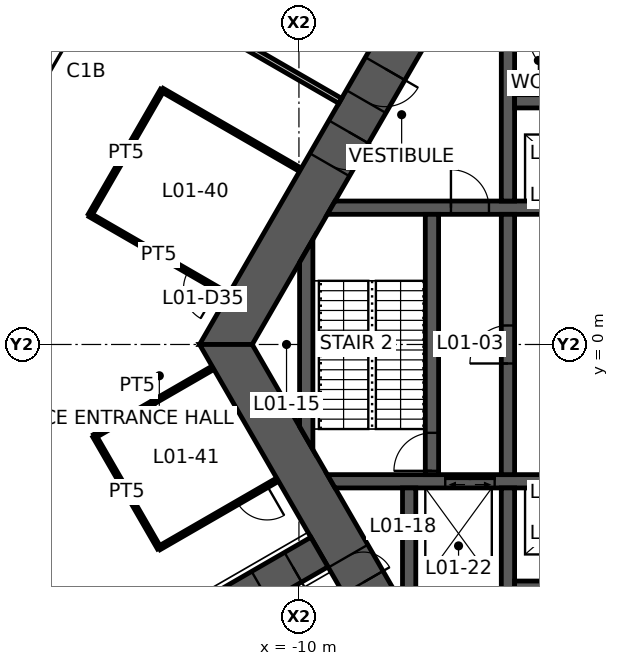
"""IFC4 building model, lengths in metres.
Left out: names, types, materials, properties, quantities, classifications, styles, units other than length and angle.
Written with IfcOpenShell. Run it as: python <this file> out.ifc"""

import sys

from ifc_helpers import new_model, si_unit, direction, frame, frame_2d, origin, place, context, subcontext, project, spatial, polyline, rectangle, outline, extrude, element, fill, save


model = new_model("IFC4")
c1 = context("Model", 3, precision=1e-05, world=origin(), true_north=direction((0.0, 1.0)))
c2 = subcontext(c1, "Body", "Model", "MODEL_VIEW")
j1 = project(units=[si_unit("LENGTHUNIT", "METRE"), si_unit("PLANEANGLEUNIT", "RADIAN")], contexts=[c1])
p1 = place(None, origin())
s1 = spatial("IfcSite", under=j1, at=p1, CompositionType="ELEMENT")
p2 = place(p1, origin())
s2 = spatial("IfcBuilding", under=s1, at=p2, CompositionType="ELEMENT")
p3 = place(p2, origin())
s3 = spatial("IfcBuildingStorey", under=s2, at=p3, CompositionType="ELEMENT", Elevation=0.0)
p4 = place(p3, frame((-5.961, 10.325, 0.0), z_axis=(0.0, 0.0, 1.0), x_axis=(-0.500004296715, -0.866022923061, 0.0)))
e1 = element("IfcWall", 1, at=p4, inside=s3, PredefinedType="SHEAR", context=c2, shape_type="SweptSolid", body=[
    extrude(outline(polyline([(-0.346, -0.6), (3.541, -0.6), (4.541, -0.6), (5.461, -0.6), (6.461, -0.6), (12.269, -0.6), (11.576, 0.6), (6.461, 0.6), (5.461, 0.6), (4.541, 0.6), (3.541, 0.6), (0.346, 0.6), (-0.346, -0.6)])), origin(), (0.0, 0.0, 1.0), 5.5),
])
p5 = place(p4, frame((3.541, 0.0, 0.0)))
e2 = element("IfcOpeningElement", 2, at=p5, cuts=e1, PredefinedType="OPENING", context=c2, shape_type="SweptSolid", body=[
    extrude(rectangle(XDim=1.0, YDim=2.1, at=frame_2d((0.5, 1.05))), frame((0.0, 0.61, 0.0), z_axis=(0.0, -1.0, 0.0), x_axis=(1.0, 0.0, 0.0)), (0.0, 0.0, 1.0), 1.22),
])
p6 = place(p4, frame((5.461, 0.0, 0.0)))
e3 = element("IfcOpeningElement", 3, at=p6, cuts=e1, PredefinedType="OPENING", context=c2, shape_type="SweptSolid", body=[
    extrude(rectangle(XDim=1.0, YDim=2.1, at=frame_2d((0.5, 1.05))), frame((0.0, 0.61, 0.0), z_axis=(0.0, -1.0, 0.0), x_axis=(1.0, 0.0, 0.0)), (0.0, 0.0, 1.0), 1.22),
])
p7 = place(p3, frame((-11.922, 0.0, 0.0), z_axis=(0.0, 0.0, 1.0), x_axis=(0.500004296715, -0.866022923061, 0.0)))
e4 = element("IfcWall", 4, at=p7, inside=s3, PredefinedType="SHEAR", context=c2, shape_type="SweptSolid", body=[
    extrude(outline(polyline([(-0.346, -0.6), (6.431, -0.6), (7.231, -0.6), (12.269, -0.6), (11.576, 0.6), (7.231, 0.6), (6.431, 0.6), (0.346, 0.6), (-0.346, -0.6)])), origin(), (0.0, 0.0, 1.0), 5.5),
])
p8 = place(p7, frame((6.431, 0.0, 0.0)))
e5 = element("IfcOpeningElement", 5, at=p8, cuts=e4, PredefinedType="OPENING", context=c2, shape_type="SweptSolid", body=[
    extrude(rectangle(XDim=0.8, YDim=2.1, at=frame_2d((0.4, 1.05))), frame((0.0, 0.61, 0.0), z_axis=(0.0, -1.0, 0.0), x_axis=(1.0, 0.0, 0.0)), (0.0, 0.0, 1.0), 1.22),
])
p9 = place(p3, frame((-9.461, -5.462, 0.0), z_axis=(0.0, 0.0, 1.0), x_axis=(-0.866019116917, -0.500010889016, 0.0)))
e6 = element("IfcWall", 6, at=p9, inside=s3, PredefinedType="SHEAR", context=c2, shape_type="SweptSolid", body=[
    extrude(rectangle(XDim=7.595, YDim=0.9, at=frame_2d((3.798, 0.0))), origin(), (0.0, 0.0, 1.0), 5.5),
])
p10 = place(p9, frame((0.8, 0.0, 0.0)))
e7 = element("IfcOpeningElement", 7, at=p10, cuts=e6, PredefinedType="OPENING", context=c2, shape_type="SweptSolid", body=[
    extrude(rectangle(XDim=1.0, YDim=2.1, at=frame_2d((0.5, 1.05))), frame((0.0, 0.46, 0.0), z_axis=(0.0, -1.0, 0.0), x_axis=(1.0, 0.0, 0.0)), (0.0, 0.0, 1.0), 0.92),
])
p11 = place(p3, frame((-9.151, 3.6, 0.0), z_axis=(0.0, 0.0, 1.0), x_axis=(1.0, 0.0, 0.0)))
e8 = element("IfcWall", 8, at=p11, inside=s3, PredefinedType="SHEAR", context=c2, shape_type="SweptSolid", body=[
    extrude(outline(polyline([(-0.101, -0.175), (3.151, -0.175), (4.151, -0.175), (5.551, -0.175), (6.651, -0.175), (7.726, -0.175), (7.726, 0.175), (6.651, 0.175), (5.551, 0.175), (4.151, 0.175), (3.151, 0.175), (0.101, 0.175), (-0.101, -0.175)])), origin(), (0.0, 0.0, 1.0), 5.5),
])
p12 = place(p11, frame((3.151, 0.0, 0.0)))
e9 = element("IfcOpeningElement", 9, at=p12, cuts=e8, PredefinedType="OPENING", context=c2, shape_type="SweptSolid", body=[
    extrude(rectangle(XDim=1.0, YDim=2.1, at=frame_2d((0.5, 1.05))), frame((0.0, 0.185, 0.0), z_axis=(0.0, -1.0, 0.0), x_axis=(1.0, 0.0, 0.0)), (0.0, 0.0, 1.0), 0.37),
])
p13 = place(p11, frame((5.551, 0.0, 0.0)))
e10 = element("IfcOpeningElement", 10, at=p13, cuts=e8, PredefinedType="OPENING", context=c2, shape_type="SweptSolid", body=[
    extrude(rectangle(XDim=1.1, YDim=2.1, at=frame_2d((0.55, 1.05))), frame((0.0, 0.185, 0.0), z_axis=(0.0, -1.0, 0.0), x_axis=(1.0, 0.0, 0.0)), (0.0, 0.0, 1.0), 0.37),
])
p14 = place(p3, frame((-9.151, -3.6, 0.0), z_axis=(0.0, 0.0, 1.0), x_axis=(1.0, 0.0, 0.0)))
e11 = element("IfcWall", 11, at=p14, inside=s3, PredefinedType="SHEAR", context=c2, shape_type="SweptSolid", body=[
    extrude(outline(polyline([(0.101, -0.175), (3.001, -0.175), (4.301, -0.175), (5.551, -0.175), (6.651, -0.175), (7.726, -0.175), (7.726, 0.175), (6.651, 0.175), (5.551, 0.175), (4.301, 0.175), (3.001, 0.175), (-0.101, 0.175), (0.101, -0.175)])), origin(), (0.0, 0.0, 1.0), 5.5),
])
p15 = place(p14, frame((5.551, 0.0, 0.0)))
e12 = element("IfcOpeningElement", 12, at=p15, cuts=e11, PredefinedType="OPENING", context=c2, shape_type="SweptSolid", body=[
    extrude(rectangle(XDim=1.1, YDim=2.1, at=frame_2d((0.55, 1.05))), frame((0.0, 0.185, 0.0), z_axis=(0.0, -1.0, 0.0), x_axis=(1.0, 0.0, 0.0)), (0.0, 0.0, 1.0), 0.37),
])
p16 = place(p14, frame((3.001, 0.0, 0.0)))
e13 = element("IfcOpeningElement", 13, at=p16, cuts=e11, PredefinedType="OPENING", context=c2, shape_type="SweptSolid", body=[
    extrude(rectangle(XDim=1.3, YDim=2.1, at=frame_2d((0.65, 1.05))), frame((0.0, 0.185, 0.0), z_axis=(0.0, -1.0, 0.0), x_axis=(1.0, 0.0, 0.0)), (0.0, 0.0, 1.0), 0.37),
])
p17 = place(p3, frame((-4.5, -3.425, 0.0), z_axis=(0.0, 0.0, 1.0), x_axis=(0.0, 1.0, 0.0)))
e14 = element("IfcWall", 14, at=p17, inside=s3, PredefinedType="SHEAR", context=c2, shape_type="SweptSolid", body=[
    extrude(rectangle(XDim=6.85, YDim=0.35, at=frame_2d((3.425, 0.0))), origin(), (0.0, 0.0, 1.0), 5.5),
])
p18 = place(p17, frame((2.925, 0.0, 0.0)))
e15 = element("IfcOpeningElement", 15, at=p18, cuts=e14, PredefinedType="OPENING", context=c2, shape_type="SweptSolid", body=[
    extrude(rectangle(XDim=1.0, YDim=2.1, at=frame_2d((0.5, 1.05))), frame((0.0, 0.185, 0.0), z_axis=(0.0, -1.0, 0.0), x_axis=(1.0, 0.0, 0.0)), (0.0, 0.0, 1.0), 0.37),
])
p19 = place(p3, frame((-6.5, -3.425, 0.0), z_axis=(0.0, 0.0, 1.0), x_axis=(0.0, 1.0, 0.0)))
e16 = element("IfcWall", 16, at=p19, inside=s3, PredefinedType="SHEAR", context=c2, shape_type="SweptSolid", body=[
    extrude(rectangle(XDim=6.85, YDim=0.35, at=frame_2d((3.425, 0.0))), origin(), (0.0, 0.0, 1.0), 5.5),
])
p20 = place(p19, frame((0.1, 0.0, 0.0)))
e17 = element("IfcOpeningElement", 17, at=p20, cuts=e16, PredefinedType="OPENING", context=c2, shape_type="SweptSolid", body=[
    extrude(rectangle(XDim=1.0, YDim=2.1, at=frame_2d((0.5, 1.05))), frame((0.0, 0.185, 0.0), z_axis=(0.0, -1.0, 0.0), x_axis=(1.0, 0.0, 0.0)), (0.0, 0.0, 1.0), 0.37),
])
for number, where, z_axis, x_axis in (
    (18, (-4.5, 3.775, 0.0), (0.0, 0.0, 1.0), (0.0, 1.0, 0.0)),
    (19, (-4.5, -3.775, 0.0), (0.0, 0.0, 1.0), (0.0, -1.0, 0.0)),
):
    element("IfcWall", number, at=place(p3, frame(where, z_axis=z_axis, x_axis=x_axis)), inside=s3, PredefinedType="SHEAR", context=c2, shape_type="SweptSolid", body=[
        extrude(rectangle(XDim=5.95, YDim=0.35, at=frame_2d((2.975, 0.0))), origin(), (0.0, 0.0, 1.0), 5.5),
    ])
for number, where, z_axis, x_axis in (
    (20, (-4.325, 6.4, 0.0), (0.0, 0.0, 1.0), (1.0, 0.0, 0.0)),
    (21, (-4.325, -6.4, 0.0), (0.0, 0.0, 1.0), (1.0, 0.0, 0.0)),
):
    element("IfcWall", number, at=place(p3, frame(where, z_axis=z_axis, x_axis=x_axis)), inside=s3, PredefinedType="SHEAR", context=c2, shape_type="SweptSolid", body=[
        extrude(rectangle(XDim=2.55, YDim=0.35, at=frame_2d((1.275, 0.0))), origin(), (0.0, 0.0, 1.0), 5.5),
    ])
p21 = place(p3, frame((-7.1, -3.775, 0.0), z_axis=(0.0, 0.0, 1.0), x_axis=(0.0, -1.0, 0.0)))
e22 = element("IfcWall", 22, at=p21, inside=s3, PredefinedType="SHEAR", context=c2, shape_type="SweptSolid", body=[
    extrude(outline(polyline([(0.0, -0.175), (3.074, -0.175), (3.377, 0.0), (3.4, 0.175), (0.0, 0.175), (0.0, -0.175)])), origin(), (0.0, 0.0, 1.0), 5.5),
])
p22 = place(p3, frame((-9.808, -2.462, 0.0), z_axis=(0.0, 0.0, 1.0), x_axis=(0.0, 1.0, 0.0)))
e23 = element("IfcWall", 23, at=p22, inside=s3, PredefinedType="SHEAR", context=c2, shape_type="SweptSolid", body=[
    extrude(outline(polyline([(-0.303, -0.175), (5.228, -0.175), (4.621, 0.175), (0.303, 0.175), (-0.303, -0.175)])), origin(), (0.0, 0.0, 1.0), 5.5),
])
p23 = place(p3, frame((-4.325, 6.7, 0.0), z_axis=(0.0, 0.0, 1.0), x_axis=(1.0, 0.0, 0.0)))
e24 = element("IfcWall", 24, at=p23, inside=s3, PredefinedType="PLUMBINGWALL", context=c2, shape_type="SweptSolid", body=[
    extrude(rectangle(XDim=2.55, YDim=0.25, at=frame_2d((1.275, 0.0))), origin(), (0.0, 0.0, 1.0), 5.5),
])
p24 = place(p3, frame((-8.914, 6.411, 0.0), z_axis=(0.0, 0.0, 1.0), x_axis=(-0.866025337903, 0.500000114109, 0.0)))
e25 = element("IfcWall", 25, at=p24, inside=s3, PredefinedType="PARTITIONING", context=c2, shape_type="SweptSolid", body=[
    extrude(rectangle(XDim=6.875, YDim=0.15, at=frame_2d((3.438, 0.0))), origin(), (0.0, 0.0, 1.0), 4.5),
])
p25 = place(p3, frame((-15.499, 3.406, 0.0), z_axis=(0.0, 0.0, 1.0), x_axis=(0.499967155389, 0.866044365799, 0.0)))
e26 = element("IfcWall", 26, at=p25, inside=s3, PredefinedType="PARTITIONING", context=c2, shape_type="SweptSolid", body=[
    extrude(rectangle(XDim=3.8, YDim=0.1, at=frame_2d((1.9, 0.0))), origin(), (0.0, 0.0, 1.0), 4.5),
])
p26 = place(p3, frame((-13.599, 6.697, 0.0), z_axis=(0.0, 0.0, 1.0), x_axis=(0.866024134012, -0.500002199304, 0.0)))
e27 = element("IfcWall", 27, at=p26, inside=s3, PredefinedType="PARTITIONING", context=c2, shape_type="SweptSolid", body=[
    extrude(rectangle(XDim=4.18, YDim=0.1, at=frame_2d((2.09, 0.0))), origin(), (0.0, 0.0, 1.0), 4.5),
])
p27 = place(p3, frame((-11.879, 1.316, 0.0), z_axis=(0.0, 0.0, 1.0), x_axis=(-0.866034823405, 0.499983684383, 0.0)))
e28 = element("IfcWall", 28, at=p27, inside=s3, PredefinedType="PARTITIONING", context=c2, shape_type="SweptSolid", body=[
    extrude(rectangle(XDim=4.18, YDim=0.1, at=frame_2d((2.09, 0.0))), origin(), (0.0, 0.0, 1.0), 4.5),
])
p28 = place(p27, frame((0.3, 0.0, 0.0)))
e29 = element("IfcOpeningElement", 29, at=p28, cuts=e28, PredefinedType="OPENING", context=c2, shape_type="SweptSolid", body=[
    extrude(rectangle(XDim=0.9, YDim=2.1, at=frame_2d((0.45, 1.05))), frame((0.0, 0.06, 0.0), z_axis=(0.0, -1.0, 0.0), x_axis=(1.0, 0.0, 0.0)), (0.0, 0.0, 1.0), 0.12),
])
p29 = place(p3, frame((-15.379, -2.413, 0.0), z_axis=(0.0, 0.0, 1.0), x_axis=(0.866018643436, 0.500011709085, 0.0)))
e30 = element("IfcWall", 30, at=p29, inside=s3, PredefinedType="PARTITIONING", context=c2, shape_type="SweptSolid", body=[
    extrude(rectangle(XDim=3.58, YDim=0.1, at=frame_2d((1.79, 0.0))), origin(), (0.0, 0.0, 1.0), 4.5),
])
p30 = place(p3, frame((-13.679, -5.357, 0.0), z_axis=(0.0, 0.0, 1.0), x_axis=(-0.500008388397, 0.866020560687, 0.0)))
e31 = element("IfcWall", 31, at=p30, inside=s3, PredefinedType="PARTITIONING", context=c2, shape_type="SweptSolid", body=[
    extrude(rectangle(XDim=3.4, YDim=0.1, at=frame_2d((1.7, 0.0))), origin(), (0.0, 0.0, 1.0), 4.5),
])
p31 = place(p3, frame((-10.579, -3.567, 0.0), z_axis=(0.0, 0.0, 1.0), x_axis=(-0.866018643436, -0.500011709085, 0.0)))
e32 = element("IfcWall", 32, at=p31, inside=s3, PredefinedType="PARTITIONING", context=c2, shape_type="SweptSolid", body=[
    extrude(rectangle(XDim=3.58, YDim=0.1, at=frame_2d((1.79, 0.0))), origin(), (0.0, 0.0, 1.0), 4.5),
])
p32 = place(p31, frame((0.3, 0.0, 0.0)))
e33 = element("IfcOpeningElement", 33, at=p32, cuts=e32, PredefinedType="OPENING", context=c2, shape_type="SweptSolid", body=[
    extrude(rectangle(XDim=0.9, YDim=2.1, at=frame_2d((0.45, 1.05))), frame((0.0, 0.06, 0.0), z_axis=(0.0, -1.0, 0.0), x_axis=(1.0, 0.0, 0.0)), (0.0, 0.0, 1.0), 0.12),
])
p33 = place(p8, origin())
e34 = element("IfcDoor", 34, at=p33, inside=s3, OperationType="SINGLE_SWING_RIGHT", PredefinedType="DOOR", context=c2, shape_type="SweptSolid", body=[
    extrude(rectangle(XDim=0.8, YDim=2.1, at=frame_2d((0.4, 1.05))), frame((0.0, 0.025, 0.0), z_axis=(0.0, -1.0, 0.0), x_axis=(1.0, 0.0, 0.0)), (0.0, 0.0, 1.0), 0.05),
])
fill(e5, e34)
p34 = place(p5, origin())
e35 = element("IfcDoor", 35, at=p34, inside=s3, OperationType="SINGLE_SWING_LEFT", PredefinedType="DOOR", context=c2, shape_type="SweptSolid", body=[
    extrude(rectangle(XDim=1.0, YDim=2.1, at=frame_2d((0.5, 1.05))), frame((0.0, 0.025, 0.0), z_axis=(0.0, -1.0, 0.0), x_axis=(1.0, 0.0, 0.0)), (0.0, 0.0, 1.0), 0.05),
])
fill(e2, e35)
p35 = place(p18, origin())
e36 = element("IfcDoor", 36, at=p35, inside=s3, OperationType="SINGLE_SWING_LEFT", PredefinedType="DOOR", context=c2, shape_type="SweptSolid", body=[
    extrude(rectangle(XDim=1.0, YDim=2.1, at=frame_2d((0.5, 1.05))), frame((0.0, 0.025, 0.0), z_axis=(0.0, -1.0, 0.0), x_axis=(1.0, 0.0, 0.0)), (0.0, 0.0, 1.0), 0.05),
])
fill(e15, e36)
p36 = place(p20, origin())
e37 = element("IfcDoor", 37, at=p36, inside=s3, OperationType="SINGLE_SWING_LEFT", PredefinedType="DOOR", context=c2, shape_type="SweptSolid", body=[
    extrude(rectangle(XDim=1.0, YDim=2.1, at=frame_2d((0.5, 1.05))), frame((0.0, 0.025, 0.0), z_axis=(0.0, -1.0, 0.0), x_axis=(1.0, 0.0, 0.0)), (0.0, 0.0, 1.0), 0.05),
])
fill(e17, e37)
p37 = place(p12, origin())
e38 = element("IfcDoor", 38, at=p37, inside=s3, OperationType="SINGLE_SWING_LEFT", PredefinedType="DOOR", context=c2, shape_type="SweptSolid", body=[
    extrude(rectangle(XDim=1.0, YDim=2.1, at=frame_2d((0.5, 1.05))), frame((0.0, 0.025, 0.0), z_axis=(0.0, -1.0, 0.0), x_axis=(1.0, 0.0, 0.0)), (0.0, 0.0, 1.0), 0.05),
])
fill(e9, e38)
p38 = place(p10, origin())
e39 = element("IfcDoor", 39, at=p38, inside=s3, OperationType="SINGLE_SWING_LEFT", PredefinedType="DOOR", context=c2, shape_type="SweptSolid", body=[
    extrude(rectangle(XDim=1.0, YDim=2.1, at=frame_2d((0.5, 1.05))), frame((0.0, 0.025, 0.0), z_axis=(0.0, -1.0, 0.0), x_axis=(1.0, 0.0, 0.0)), (0.0, 0.0, 1.0), 0.05),
])
fill(e7, e39)
p39 = place(p28, origin())
e40 = element("IfcDoor", 40, at=p39, inside=s3, OperationType="SINGLE_SWING_LEFT", PredefinedType="DOOR", context=c2, shape_type="SweptSolid", body=[
    extrude(rectangle(XDim=0.9, YDim=2.1, at=frame_2d((0.45, 1.05))), frame((0.0, 0.025, 0.0), z_axis=(0.0, -1.0, 0.0), x_axis=(1.0, 0.0, 0.0)), (0.0, 0.0, 1.0), 0.05),
])
fill(e29, e40)
p40 = place(p32, origin())
e41 = element("IfcDoor", 41, at=p40, inside=s3, OperationType="SINGLE_SWING_LEFT", PredefinedType="DOOR", context=c2, shape_type="SweptSolid", body=[
    extrude(rectangle(XDim=0.9, YDim=2.1, at=frame_2d((0.45, 1.05))), frame((0.0, 0.025, 0.0), z_axis=(0.0, -1.0, 0.0), x_axis=(1.0, 0.0, 0.0)), (0.0, 0.0, 1.0), 0.05),
])
fill(e33, e41)
p41 = place(p6, origin())
e42 = element("IfcDoor", 42, at=p41, inside=s3, OperationType="SINGLE_SWING_LEFT", PredefinedType="DOOR", context=c2, shape_type="SweptSolid", body=[
    extrude(rectangle(XDim=1.0, YDim=2.1, at=frame_2d((0.5, 1.05))), frame((0.0, 0.025, 0.0), z_axis=(0.0, -1.0, 0.0), x_axis=(1.0, 0.0, 0.0)), (0.0, 0.0, 1.0), 0.05),
])
fill(e3, e42)
p42 = place(p16, origin())
e43 = element("IfcDoor", 43, at=p42, inside=s3, OperationType="DOUBLE_DOOR_SLIDING", PredefinedType="DOOR", context=c2, shape_type="SweptSolid", body=[
    extrude(rectangle(XDim=1.3, YDim=2.1, at=frame_2d((0.65, 1.05))), frame((0.0, 0.025, 0.0), z_axis=(0.0, -1.0, 0.0), x_axis=(1.0, 0.0, 0.0)), (0.0, 0.0, 1.0), 0.05),
])
fill(e13, e43)
save(model, sys.argv[1])
